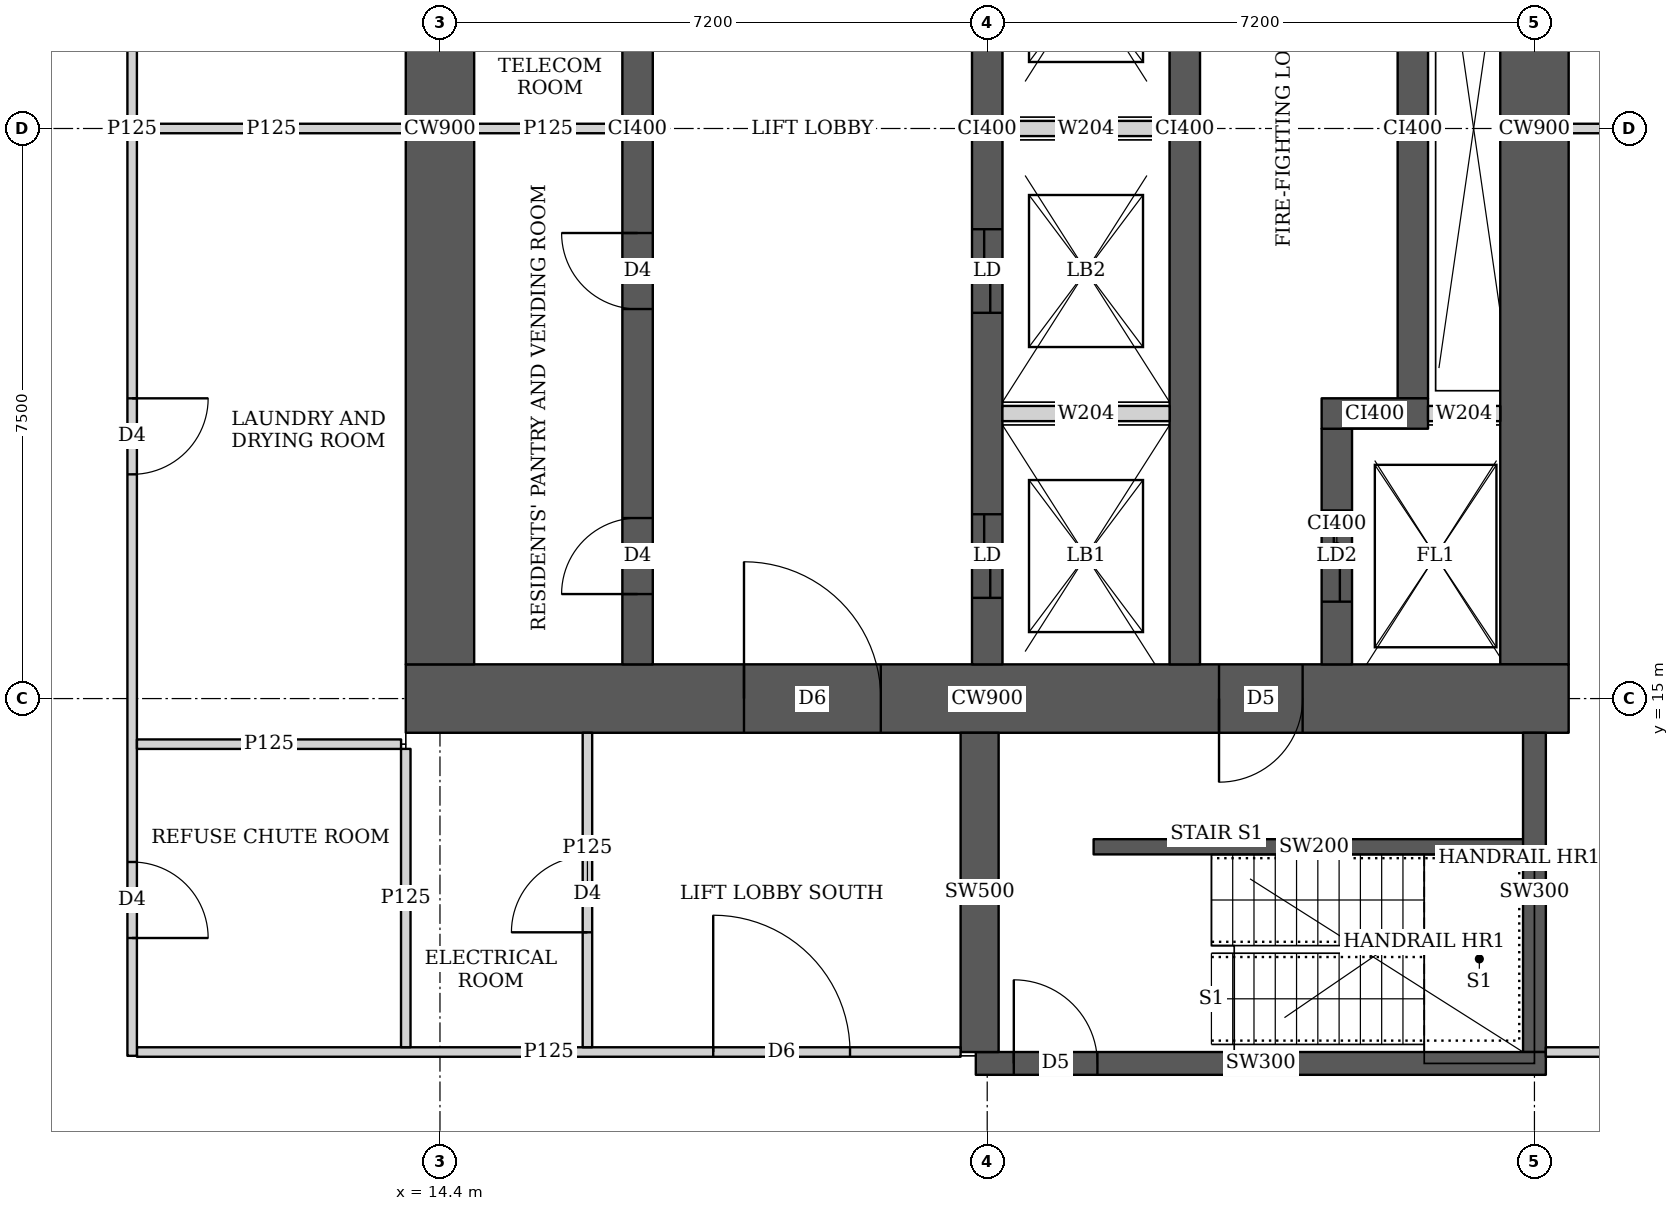
"""IFC4 building model, lengths in metres.
Left out: names, types, materials, properties, quantities, classifications, styles, units other than length and angle.
Written with IfcOpenShell. Run it as: python <this file> out.ifc"""

import sys

from ifc_helpers import new_model, si_unit, direction, frame, frame_2d, origin, place, context, subcontext, project, spatial, rectangle, extrude, element, fill, save


model = new_model("IFC4")
c1 = context("Model", 3, precision=1e-05, world=origin(), true_north=direction((0.0, 1.0)))
c2 = subcontext(c1, "Body", "Model", "MODEL_VIEW")
j1 = project(units=[si_unit("LENGTHUNIT", "METRE"), si_unit("PLANEANGLEUNIT", "RADIAN")], contexts=[c1])
p1 = place(None, origin())
s1 = spatial("IfcSite", under=j1, at=p1, CompositionType="ELEMENT")
p2 = place(p1, origin())
s2 = spatial("IfcBuilding", under=s1, at=p2, CompositionType="ELEMENT")
p3 = place(p2, frame((0.0, 0.0, 180.8)))
s3 = spatial("IfcBuildingStorey", under=s2, at=p3, CompositionType="ELEMENT", Elevation=180.8)
p4 = place(p3, frame((13.95, 15.0, 0.0), z_axis=(0.0, 0.0, 1.0), x_axis=(1.0, 0.0, 0.0)))
e1 = element("IfcWall", 1, at=p4, inside=s3, PredefinedType="SHEAR", context=c2, shape_type="SweptSolid", body=[
    extrude(rectangle(XDim=15.3, YDim=0.9, at=frame_2d((7.65, 0.0))), origin(), (0.0, 0.0, 1.0), 3.75),
])
p5 = place(p4, frame((4.45, 0.0, 0.0)))
e2 = element("IfcOpeningElement", 2, at=p5, cuts=e1, PredefinedType="OPENING", context=c2, shape_type="SweptSolid", body=[
    extrude(rectangle(XDim=1.8, YDim=2.1, at=frame_2d((0.9, 1.05))), frame((0.0, 0.46, 0.0), z_axis=(0.0, -1.0, 0.0), x_axis=(1.0, 0.0, 0.0)), (0.0, 0.0, 1.0), 0.92),
])
p6 = place(p4, frame((10.7, 0.0, 0.0)))
e3 = element("IfcOpeningElement", 3, at=p6, cuts=e1, PredefinedType="OPENING", context=c2, shape_type="SweptSolid", body=[
    extrude(rectangle(XDim=1.1, YDim=2.1, at=frame_2d((0.55, 1.05))), frame((0.0, 0.46, 0.0), z_axis=(0.0, -1.0, 0.0), x_axis=(1.0, 0.0, 0.0)), (0.0, 0.0, 1.0), 0.92),
])
for number, where, z_axis, x_axis in (
    (4, (14.4, 15.45, 0.0), (0.0, 0.0, 1.0), (0.0, 1.0, 0.0)),
    (5, (28.8, 15.45, 0.0), (0.0, 0.0, 1.0), (0.0, 1.0, 0.0)),
):
    element("IfcWall", number, at=place(p3, frame(where, z_axis=z_axis, x_axis=x_axis)), inside=s3, PredefinedType="SHEAR", context=c2, shape_type="SweptSolid", body=[
        extrude(rectangle(XDim=14.1, YDim=0.9, at=frame_2d((7.05, 0.0))), origin(), (0.0, 0.0, 1.0), 3.75),
    ])
p7 = place(p3, frame((17.0, 15.45, 0.0), z_axis=(0.0, 0.0, 1.0), x_axis=(0.0, 1.0, 0.0)))
e6 = element("IfcWall", 6, at=p7, inside=s3, PredefinedType="SHEAR", context=c2, shape_type="SweptSolid", body=[
    extrude(rectangle(XDim=14.1, YDim=0.4, at=frame_2d((7.05, 0.0))), origin(), (0.0, 0.0, 1.0), 3.75),
])
p8 = place(p7, frame((0.925, 0.0, 0.0)))
e7 = element("IfcOpeningElement", 7, at=p8, cuts=e6, PredefinedType="OPENING", context=c2, shape_type="SweptSolid", body=[
    extrude(rectangle(XDim=1.0, YDim=2.1, at=frame_2d((0.5, 1.05))), frame((0.0, 0.21, 0.0), z_axis=(0.0, -1.0, 0.0), x_axis=(1.0, 0.0, 0.0)), (0.0, 0.0, 1.0), 0.42),
])
p9 = place(p7, frame((4.675, 0.0, 0.0)))
e8 = element("IfcOpeningElement", 8, at=p9, cuts=e6, PredefinedType="OPENING", context=c2, shape_type="SweptSolid", body=[
    extrude(rectangle(XDim=1.0, YDim=2.1, at=frame_2d((0.5, 1.05))), frame((0.0, 0.21, 0.0), z_axis=(0.0, -1.0, 0.0), x_axis=(1.0, 0.0, 0.0)), (0.0, 0.0, 1.0), 0.42),
])
p10 = place(p7, frame((8.425, 0.0, 0.0)))
e9 = element("IfcOpeningElement", 9, at=p10, cuts=e6, PredefinedType="OPENING", context=c2, shape_type="SweptSolid", body=[
    extrude(rectangle(XDim=1.0, YDim=2.1, at=frame_2d((0.5, 1.05))), frame((0.0, 0.21, 0.0), z_axis=(0.0, -1.0, 0.0), x_axis=(1.0, 0.0, 0.0)), (0.0, 0.0, 1.0), 0.42),
])
p11 = place(p7, frame((12.175, 0.0, 0.0)))
e10 = element("IfcOpeningElement", 10, at=p11, cuts=e6, PredefinedType="OPENING", context=c2, shape_type="SweptSolid", body=[
    extrude(rectangle(XDim=1.0, YDim=2.1, at=frame_2d((0.5, 1.05))), frame((0.0, 0.21, 0.0), z_axis=(0.0, -1.0, 0.0), x_axis=(1.0, 0.0, 0.0)), (0.0, 0.0, 1.0), 0.42),
])
p12 = place(p3, frame((21.6, 15.45, 0.0), z_axis=(0.0, 0.0, 1.0), x_axis=(0.0, 1.0, 0.0)))
e11 = element("IfcWall", 11, at=p12, inside=s3, PredefinedType="SHEAR", context=c2, shape_type="SweptSolid", body=[
    extrude(rectangle(XDim=14.1, YDim=0.4, at=frame_2d((7.05, 0.0))), origin(), (0.0, 0.0, 1.0), 3.75),
])
p13 = place(p12, frame((0.875, 0.0, 0.0)))
e12 = element("IfcOpeningElement", 12, at=p13, cuts=e11, PredefinedType="OPENING", context=c2, shape_type="SweptSolid", body=[
    extrude(rectangle(XDim=1.1, YDim=2.1, at=frame_2d((0.55, 1.05))), frame((0.0, 0.21, 0.0), z_axis=(0.0, -1.0, 0.0), x_axis=(1.0, 0.0, 0.0)), (0.0, 0.0, 1.0), 0.42),
])
p14 = place(p12, frame((4.625, 0.0, 0.0)))
e13 = element("IfcOpeningElement", 13, at=p14, cuts=e11, PredefinedType="OPENING", context=c2, shape_type="SweptSolid", body=[
    extrude(rectangle(XDim=1.1, YDim=2.1, at=frame_2d((0.55, 1.05))), frame((0.0, 0.21, 0.0), z_axis=(0.0, -1.0, 0.0), x_axis=(1.0, 0.0, 0.0)), (0.0, 0.0, 1.0), 0.42),
])
p15 = place(p12, frame((8.375, 0.0, 0.0)))
e14 = element("IfcOpeningElement", 14, at=p15, cuts=e11, PredefinedType="OPENING", context=c2, shape_type="SweptSolid", body=[
    extrude(rectangle(XDim=1.1, YDim=2.1, at=frame_2d((0.55, 1.05))), frame((0.0, 0.21, 0.0), z_axis=(0.0, -1.0, 0.0), x_axis=(1.0, 0.0, 0.0)), (0.0, 0.0, 1.0), 0.42),
])
p16 = place(p12, frame((12.125, 0.0, 0.0)))
e15 = element("IfcOpeningElement", 15, at=p16, cuts=e11, PredefinedType="OPENING", context=c2, shape_type="SweptSolid", body=[
    extrude(rectangle(XDim=1.1, YDim=2.1, at=frame_2d((0.55, 1.05))), frame((0.0, 0.21, 0.0), z_axis=(0.0, -1.0, 0.0), x_axis=(1.0, 0.0, 0.0)), (0.0, 0.0, 1.0), 0.42),
])
p17 = place(p3, frame((24.2, 15.45, 0.0), z_axis=(0.0, 0.0, 1.0), x_axis=(0.0, 1.0, 0.0)))
e16 = element("IfcWall", 16, at=p17, inside=s3, PredefinedType="SHEAR", context=c2, shape_type="SweptSolid", body=[
    extrude(rectangle(XDim=14.1, YDim=0.4, at=frame_2d((7.05, 0.0))), origin(), (0.0, 0.0, 1.0), 3.75),
])
p18 = place(p3, frame((26.2, 15.45, 0.0), z_axis=(0.0, 0.0, 1.0), x_axis=(0.0, 1.0, 0.0)))
e17 = element("IfcWall", 17, at=p18, inside=s3, PredefinedType="SHEAR", context=c2, shape_type="SweptSolid", body=[
    extrude(rectangle(XDim=3.1, YDim=0.4, at=frame_2d((1.55, 0.0))), origin(), (0.0, 0.0, 1.0), 3.75),
])
p19 = place(p18, frame((0.825, 0.0, 0.0)))
e18 = element("IfcOpeningElement", 18, at=p19, cuts=e17, PredefinedType="OPENING", context=c2, shape_type="SweptSolid", body=[
    extrude(rectangle(XDim=1.2, YDim=2.1, at=frame_2d((0.6, 1.05))), frame((0.0, 0.21, 0.0), z_axis=(0.0, -1.0, 0.0), x_axis=(1.0, 0.0, 0.0)), (0.0, 0.0, 1.0), 0.42),
])
p20 = place(p3, frame((26.0, 18.75, 0.0), z_axis=(0.0, 0.0, 1.0), x_axis=(1.0, 0.0, 0.0)))
e19 = element("IfcWall", 19, at=p20, inside=s3, PredefinedType="SHEAR", context=c2, shape_type="SweptSolid", body=[
    extrude(rectangle(XDim=1.4, YDim=0.4, at=frame_2d((0.7, 0.0))), origin(), (0.0, 0.0, 1.0), 3.75),
])
p21 = place(p3, frame((27.2, 18.95, 0.0), z_axis=(0.0, 0.0, 1.0), x_axis=(0.0, 1.0, 0.0)))
e20 = element("IfcWall", 20, at=p21, inside=s3, PredefinedType="SHEAR", context=c2, shape_type="SweptSolid", body=[
    extrude(rectangle(XDim=7.1, YDim=0.4, at=frame_2d((3.55, 0.0))), origin(), (0.0, 0.0, 1.0), 3.75),
])
p22 = place(p3, frame((21.45, 10.2, 0.0), z_axis=(0.0, 0.0, 1.0), x_axis=(1.0, 0.0, 0.0)))
e21 = element("IfcWall", 21, at=p22, inside=s3, PredefinedType="SHEAR", context=c2, shape_type="SweptSolid", body=[
    extrude(rectangle(XDim=7.5, YDim=0.3, at=frame_2d((3.75, 0.0))), origin(), (0.0, 0.0, 1.0), 3.75),
])
p23 = place(p22, frame((0.5, 0.0, 0.0)))
e22 = element("IfcOpeningElement", 22, at=p23, cuts=e21, PredefinedType="OPENING", context=c2, shape_type="SweptSolid", body=[
    extrude(rectangle(XDim=1.1, YDim=2.1, at=frame_2d((0.55, 1.05))), frame((0.0, 0.16, 0.0), z_axis=(0.0, -1.0, 0.0), x_axis=(1.0, 0.0, 0.0)), (0.0, 0.0, 1.0), 0.32),
])
p24 = place(p3, frame((21.5, 10.35, 0.0), z_axis=(0.0, 0.0, 1.0), x_axis=(0.0, 1.0, 0.0)))
e23 = element("IfcWall", 23, at=p24, inside=s3, PredefinedType="SHEAR", context=c2, shape_type="SweptSolid", body=[
    extrude(rectangle(XDim=4.2, YDim=0.5, at=frame_2d((2.1, 0.0))), origin(), (0.0, 0.0, 1.0), 3.75),
])
p25 = place(p3, frame((28.8, 10.35, 0.0), z_axis=(0.0, 0.0, 1.0), x_axis=(0.0, 1.0, 0.0)))
e24 = element("IfcWall", 24, at=p25, inside=s3, PredefinedType="SHEAR", context=c2, shape_type="SweptSolid", body=[
    extrude(rectangle(XDim=4.2, YDim=0.3, at=frame_2d((2.1, 0.0))), origin(), (0.0, 0.0, 1.0), 3.75),
])
p26 = place(p3, frame((10.35, 10.3, 0.0), z_axis=(0.0, 0.0, 1.0), x_axis=(0.0, 1.0, 0.0)))
e25 = element("IfcWall", 25, at=p26, inside=s3, PredefinedType="PARTITIONING", context=c2, shape_type="SweptSolid", body=[
    extrude(rectangle(XDim=24.4, YDim=0.125, at=frame_2d((12.2, 0.0))), origin(), (0.0, 0.0, 1.0), 3.5),
])
p27 = place(p26, frame((1.55, 0.0, 0.0)))
e26 = element("IfcOpeningElement", 26, at=p27, cuts=e25, PredefinedType="OPENING", context=c2, shape_type="SweptSolid", body=[
    extrude(rectangle(XDim=1.0, YDim=2.1, at=frame_2d((0.5, 1.05))), frame((0.0, 0.073, 0.0), z_axis=(0.0, -1.0, 0.0), x_axis=(1.0, 0.0, 0.0)), (0.0, 0.0, 1.0), 0.145),
])
p28 = place(p26, frame((7.65, 0.0, 0.0)))
e27 = element("IfcOpeningElement", 27, at=p28, cuts=e25, PredefinedType="OPENING", context=c2, shape_type="SweptSolid", body=[
    extrude(rectangle(XDim=1.0, YDim=2.1, at=frame_2d((0.5, 1.05))), frame((0.0, 0.073, 0.0), z_axis=(0.0, -1.0, 0.0), x_axis=(1.0, 0.0, 0.0)), (0.0, 0.0, 1.0), 0.145),
])
p29 = place(p26, frame((15.75, 0.0, 0.0)))
e28 = element("IfcOpeningElement", 28, at=p29, cuts=e25, PredefinedType="OPENING", context=c2, shape_type="SweptSolid", body=[
    extrude(rectangle(XDim=1.0, YDim=2.1, at=frame_2d((0.5, 1.05))), frame((0.0, 0.073, 0.0), z_axis=(0.0, -1.0, 0.0), x_axis=(1.0, 0.0, 0.0)), (0.0, 0.0, 1.0), 0.145),
])
p30 = place(p26, frame((21.85, 0.0, 0.0)))
e29 = element("IfcOpeningElement", 29, at=p30, cuts=e25, PredefinedType="OPENING", context=c2, shape_type="SweptSolid", body=[
    extrude(rectangle(XDim=1.0, YDim=2.1, at=frame_2d((0.5, 1.05))), frame((0.0, 0.073, 0.0), z_axis=(0.0, -1.0, 0.0), x_axis=(1.0, 0.0, 0.0)), (0.0, 0.0, 1.0), 0.145),
])
p31 = place(p3, frame((10.413, 14.4, 0.0), z_axis=(0.0, 0.0, 1.0), x_axis=(1.0, 0.0, 0.0)))
e30 = element("IfcWall", 30, at=p31, inside=s3, PredefinedType="PARTITIONING", context=c2, shape_type="SweptSolid", body=[
    extrude(rectangle(XDim=3.475, YDim=0.125, at=frame_2d((1.737, 0.0))), origin(), (0.0, 0.0, 1.0), 3.5),
])
p32 = place(p3, frame((10.413, 22.5, 0.0), z_axis=(0.0, 0.0, 1.0), x_axis=(1.0, 0.0, 0.0)))
e31 = element("IfcWall", 31, at=p32, inside=s3, PredefinedType="PARTITIONING", context=c2, shape_type="SweptSolid", body=[
    extrude(rectangle(XDim=3.537, YDim=0.125, at=frame_2d((1.769, 0.0))), origin(), (0.0, 0.0, 1.0), 3.5),
])
p33 = place(p3, frame((13.95, 10.413, 0.0), z_axis=(0.0, 0.0, 1.0), x_axis=(0.0, 1.0, 0.0)))
e32 = element("IfcWall", 32, at=p33, inside=s3, PredefinedType="PARTITIONING", context=c2, shape_type="SweptSolid", body=[
    extrude(rectangle(XDim=3.925, YDim=0.125, at=frame_2d((1.962, 0.0))), origin(), (0.0, 0.0, 1.0), 3.5),
])
p34 = place(p3, frame((10.413, 10.35, 0.0), z_axis=(0.0, 0.0, 1.0), x_axis=(1.0, 0.0, 0.0)))
e33 = element("IfcWall", 33, at=p34, inside=s3, PredefinedType="PARTITIONING", context=c2, shape_type="SweptSolid", body=[
    extrude(rectangle(XDim=10.837, YDim=0.125, at=frame_2d((5.418, 0.0))), origin(), (0.0, 0.0, 1.0), 3.5),
])
p35 = place(p34, frame((7.582, 0.0, 0.0)))
e34 = element("IfcOpeningElement", 34, at=p35, cuts=e33, PredefinedType="OPENING", context=c2, shape_type="SweptSolid", body=[
    extrude(rectangle(XDim=1.8, YDim=2.1, at=frame_2d((0.9, 1.05))), frame((0.0, 0.073, 0.0), z_axis=(0.0, -1.0, 0.0), x_axis=(1.0, 0.0, 0.0)), (0.0, 0.0, 1.0), 0.145),
])
p36 = place(p3, frame((16.34, 10.413, 0.0), z_axis=(0.0, 0.0, 1.0), x_axis=(0.0, 1.0, 0.0)))
e35 = element("IfcWall", 35, at=p36, inside=s3, PredefinedType="PARTITIONING", context=c2, shape_type="SweptSolid", body=[
    extrude(rectangle(XDim=4.137, YDim=0.125, at=frame_2d((2.068, 0.0))), origin(), (0.0, 0.0, 1.0), 3.5),
])
p37 = place(p36, frame((1.512, 0.0, 0.0)))
e36 = element("IfcOpeningElement", 36, at=p37, cuts=e35, PredefinedType="OPENING", context=c2, shape_type="SweptSolid", body=[
    extrude(rectangle(XDim=1.0, YDim=2.1, at=frame_2d((0.5, 1.05))), frame((0.0, 0.073, 0.0), z_axis=(0.0, -1.0, 0.0), x_axis=(1.0, 0.0, 0.0)), (0.0, 0.0, 1.0), 0.145),
])
p38 = place(p3, frame((28.95, 10.35, 0.0), z_axis=(0.0, 0.0, 1.0), x_axis=(1.0, 0.0, 0.0)))
e37 = element("IfcWall", 37, at=p38, inside=s3, PredefinedType="PARTITIONING", context=c2, shape_type="SweptSolid", body=[
    extrude(rectangle(XDim=9.013, YDim=0.125, at=frame_2d((4.506, 0.0))), origin(), (0.0, 0.0, 1.0), 3.5),
])
p39 = place(p3, frame((29.25, 22.5, 0.0), z_axis=(0.0, 0.0, 1.0), x_axis=(1.0, 0.0, 0.0)))
e38 = element("IfcWall", 38, at=p39, inside=s3, PredefinedType="PARTITIONING", context=c2, shape_type="SweptSolid", body=[
    extrude(rectangle(XDim=2.999, YDim=0.125, at=frame_2d((1.5, 0.0))), origin(), (0.0, 0.0, 1.0), 3.5),
])
p40 = place(p3, frame((14.85, 22.5, 0.0), z_axis=(0.0, 0.0, 1.0), x_axis=(1.0, 0.0, 0.0)))
e39 = element("IfcWall", 39, at=p40, inside=s3, PredefinedType="PARTITIONING", context=c2, shape_type="SweptSolid", body=[
    extrude(rectangle(XDim=1.95, YDim=0.125, at=frame_2d((0.975, 0.0))), origin(), (0.0, 0.0, 1.0), 3.5),
])
p41 = place(p3, frame((23.0, 13.05, 0.0), z_axis=(0.0, 0.0, 1.0), x_axis=(1.0, 0.0, 0.0)))
e40 = element("IfcWall", 40, at=p41, inside=s3, PredefinedType="SHEAR", context=c2, shape_type="SweptSolid", body=[
    extrude(rectangle(XDim=5.8, YDim=0.2, at=frame_2d((2.9, 0.0))), origin(), (0.0, 0.0, 1.0), 3.75),
])
for number, where, z_axis, x_axis in (
    (41, (21.8, 18.75, 0.0), (0.0, 0.0, 1.0), (1.0, 0.0, 0.0)),
    (42, (21.8, 22.5, 0.0), (0.0, 0.0, 1.0), (1.0, 0.0, 0.0)),
):
    element("IfcWall", number, at=place(p3, frame(where, z_axis=z_axis, x_axis=x_axis)), inside=s3, PredefinedType="SOLIDWALL", context=c2, shape_type="SweptSolid", body=[
        extrude(rectangle(XDim=2.2, YDim=0.2, at=frame_2d((1.1, 0.0))), origin(), (0.0, 0.0, 1.0), 3.5),
    ])
p42 = place(p3, frame((27.4, 18.75, 0.0), z_axis=(0.0, 0.0, 1.0), x_axis=(1.0, 0.0, 0.0)))
e43 = element("IfcWall", 43, at=p42, inside=s3, PredefinedType="SOLIDWALL", context=c2, shape_type="SweptSolid", body=[
    extrude(rectangle(XDim=0.95, YDim=0.2, at=frame_2d((0.475, 0.0))), origin(), (0.0, 0.0, 1.0), 3.5),
])
p43 = place(p27, origin())
e44 = element("IfcDoor", 44, at=p43, inside=s3, OperationType="SINGLE_SWING_RIGHT", PredefinedType="DOOR", context=c2, shape_type="SweptSolid", body=[
    extrude(rectangle(XDim=1.0, YDim=2.1, at=frame_2d((0.5, 1.05))), frame((0.0, 0.025, 0.0), z_axis=(0.0, -1.0, 0.0), x_axis=(1.0, 0.0, 0.0)), (0.0, 0.0, 1.0), 0.05),
])
fill(e26, e44)
p44 = place(p28, origin())
e45 = element("IfcDoor", 45, at=p44, inside=s3, OperationType="SINGLE_SWING_LEFT", PredefinedType="DOOR", context=c2, shape_type="SweptSolid", body=[
    extrude(rectangle(XDim=1.0, YDim=2.1, at=frame_2d((0.5, 1.05))), frame((0.0, 0.025, 0.0), z_axis=(0.0, -1.0, 0.0), x_axis=(1.0, 0.0, 0.0)), (0.0, 0.0, 1.0), 0.05),
])
fill(e27, e45)
p45 = place(p37, origin())
e46 = element("IfcDoor", 46, at=p45, inside=s3, OperationType="SINGLE_SWING_LEFT", PredefinedType="DOOR", context=c2, shape_type="SweptSolid", body=[
    extrude(rectangle(XDim=1.0, YDim=2.1, at=frame_2d((0.5, 1.05))), frame((0.0, 0.025, 0.0), z_axis=(0.0, -1.0, 0.0), x_axis=(1.0, 0.0, 0.0)), (0.0, 0.0, 1.0), 0.05),
])
fill(e36, e46)
p46 = place(p35, origin())
e47 = element("IfcDoor", 47, at=p46, inside=s3, OperationType="DOUBLE_DOOR_SINGLE_SWING", PredefinedType="DOOR", context=c2, shape_type="SweptSolid", body=[
    extrude(rectangle(XDim=1.8, YDim=2.1, at=frame_2d((0.9, 1.05))), frame((0.0, 0.025, 0.0), z_axis=(0.0, -1.0, 0.0), x_axis=(1.0, 0.0, 0.0)), (0.0, 0.0, 1.0), 0.05),
])
fill(e34, e47)
p47 = place(p8, origin())
e48 = element("IfcDoor", 48, at=p47, inside=s3, OperationType="SINGLE_SWING_LEFT", PredefinedType="DOOR", context=c2, shape_type="SweptSolid", body=[
    extrude(rectangle(XDim=1.0, YDim=2.1, at=frame_2d((0.5, 1.05))), frame((0.0, 0.025, 0.0), z_axis=(0.0, -1.0, 0.0), x_axis=(1.0, 0.0, 0.0)), (0.0, 0.0, 1.0), 0.05),
])
fill(e7, e48)
p48 = place(p9, origin())
e49 = element("IfcDoor", 49, at=p48, inside=s3, OperationType="SINGLE_SWING_RIGHT", PredefinedType="DOOR", context=c2, shape_type="SweptSolid", body=[
    extrude(rectangle(XDim=1.0, YDim=2.1, at=frame_2d((0.5, 1.05))), frame((0.0, 0.025, 0.0), z_axis=(0.0, -1.0, 0.0), x_axis=(1.0, 0.0, 0.0)), (0.0, 0.0, 1.0), 0.05),
])
fill(e8, e49)
p49 = place(p5, origin())
e50 = element("IfcDoor", 50, at=p49, inside=s3, OperationType="DOUBLE_DOOR_SINGLE_SWING", PredefinedType="DOOR", context=c2, shape_type="SweptSolid", body=[
    extrude(rectangle(XDim=1.8, YDim=2.1, at=frame_2d((0.9, 1.05))), frame((0.0, 0.025, 0.0), z_axis=(0.0, -1.0, 0.0), x_axis=(1.0, 0.0, 0.0)), (0.0, 0.0, 1.0), 0.05),
])
fill(e2, e50)
p50 = place(p6, origin())
e51 = element("IfcDoor", 51, at=p50, inside=s3, OperationType="SINGLE_SWING_RIGHT", PredefinedType="DOOR", context=c2, shape_type="SweptSolid", body=[
    extrude(rectangle(XDim=1.1, YDim=2.1, at=frame_2d((0.55, 1.05))), frame((0.0, 0.025, 0.0), z_axis=(0.0, -1.0, 0.0), x_axis=(1.0, 0.0, 0.0)), (0.0, 0.0, 1.0), 0.05),
])
fill(e3, e51)
p51 = place(p19, origin())
e52 = element("IfcDoor", 52, at=p51, inside=s3, OperationType="DOUBLE_DOOR_SLIDING", PredefinedType="DOOR", context=c2, shape_type="SweptSolid", body=[
    extrude(rectangle(XDim=1.2, YDim=2.1, at=frame_2d((0.6, 1.05))), frame((0.0, 0.025, 0.0), z_axis=(0.0, -1.0, 0.0), x_axis=(1.0, 0.0, 0.0)), (0.0, 0.0, 1.0), 0.05),
])
fill(e18, e52)
p52 = place(p13, origin())
e53 = element("IfcDoor", 53, at=p52, inside=s3, OperationType="DOUBLE_DOOR_SLIDING", PredefinedType="DOOR", context=c2, shape_type="SweptSolid", body=[
    extrude(rectangle(XDim=1.1, YDim=2.1, at=frame_2d((0.55, 1.05))), frame((0.0, 0.025, 0.0), z_axis=(0.0, -1.0, 0.0), x_axis=(1.0, 0.0, 0.0)), (0.0, 0.0, 1.0), 0.05),
])
fill(e12, e53)
p53 = place(p14, origin())
e54 = element("IfcDoor", 54, at=p53, inside=s3, OperationType="DOUBLE_DOOR_SLIDING", PredefinedType="DOOR", context=c2, shape_type="SweptSolid", body=[
    extrude(rectangle(XDim=1.1, YDim=2.1, at=frame_2d((0.55, 1.05))), frame((0.0, 0.025, 0.0), z_axis=(0.0, -1.0, 0.0), x_axis=(1.0, 0.0, 0.0)), (0.0, 0.0, 1.0), 0.05),
])
fill(e13, e54)
p54 = place(p23, origin())
e55 = element("IfcDoor", 55, at=p54, inside=s3, OperationType="SINGLE_SWING_LEFT", PredefinedType="DOOR", context=c2, shape_type="SweptSolid", body=[
    extrude(rectangle(XDim=1.1, YDim=2.1, at=frame_2d((0.55, 1.05))), frame((0.0, 0.025, 0.0), z_axis=(0.0, -1.0, 0.0), x_axis=(1.0, 0.0, 0.0)), (0.0, 0.0, 1.0), 0.05),
])
fill(e22, e55)
save(model, sys.argv[1])
